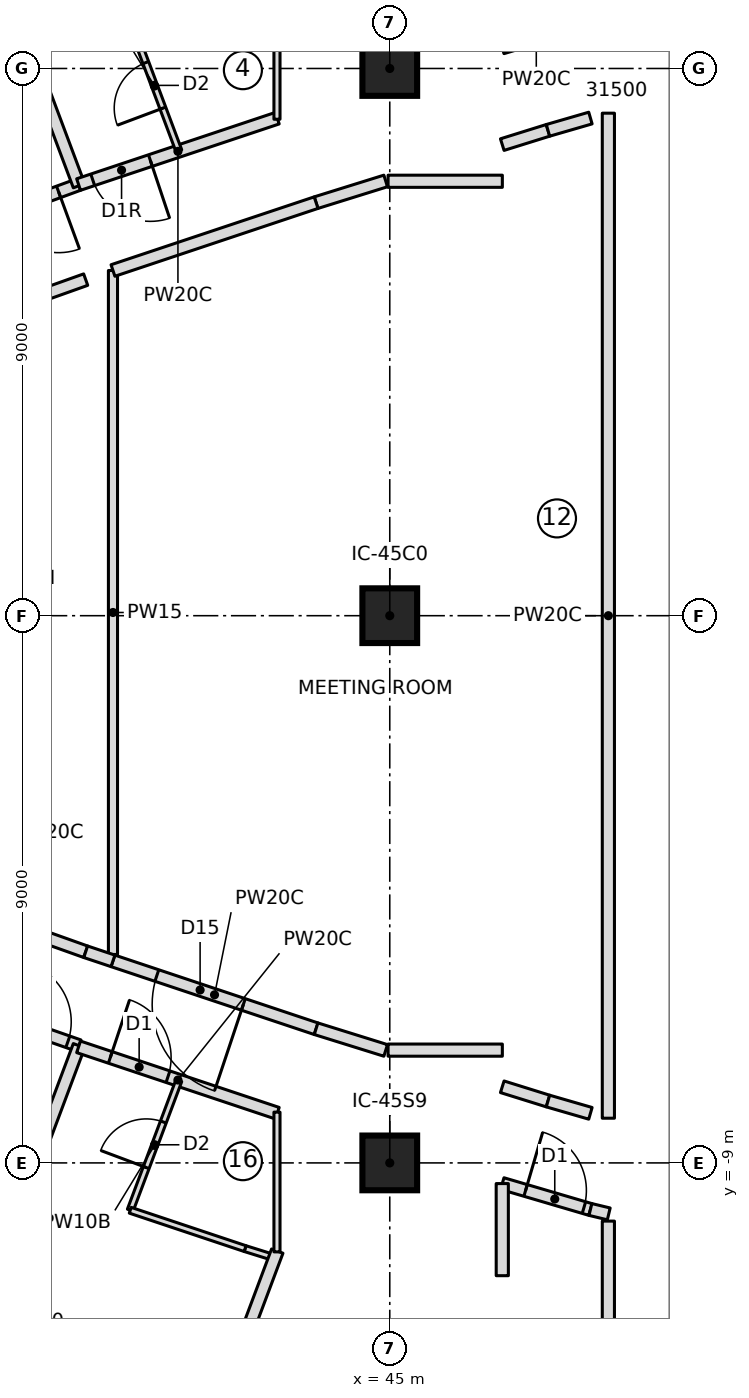
"""IFC4 building model, lengths in metres.
Left out: names, types, materials, properties, quantities, classifications, styles, units other than length and angle.
Written with IfcOpenShell. Run it as: python <this file> out.ifc"""

import sys

from ifc_helpers import new_model, si_unit, direction, frame, frame_2d, origin, origin_2d, place, context, subcontext, project, spatial, rectangle, extrude, element, fill, save


model = new_model("IFC4")
c1 = context("Model", 3, precision=1e-05, world=origin(), true_north=direction((0.0, 1.0)))
c2 = subcontext(c1, "Body", "Model", "MODEL_VIEW")
j1 = project(units=[si_unit("LENGTHUNIT", "METRE"), si_unit("PLANEANGLEUNIT", "RADIAN")], contexts=[c1])
p1 = place(None, origin())
s1 = spatial("IfcSite", under=j1, at=p1, CompositionType="ELEMENT")
p2 = place(p1, origin())
s2 = spatial("IfcBuilding", under=s1, at=p2, CompositionType="ELEMENT")
p3 = place(p2, frame((0.0, 0.0, 224.35)))
s3 = spatial("IfcBuildingStorey", under=s2, at=p3, CompositionType="ELEMENT", Elevation=224.35)
for number, where, z_axis, x_axis in (
    (1, (45.0, -9.0, 0.0), (0.0, 0.0, 1.0), (1.0, 0.0, 0.0)),
    (2, (45.0, 0.0, 0.0), (0.0, 0.0, 1.0), (1.0, 0.0, 0.0)),
    (3, (45.0, 9.0, 0.0), (0.0, 0.0, 1.0), (1.0, 0.0, 0.0)),
):
    element("IfcColumn", number, at=place(p3, frame(where, z_axis=z_axis, x_axis=x_axis)), inside=s3, PredefinedType="COLUMN", context=c2, shape_type="SweptSolid", body=[
        extrude(rectangle(XDim=0.9, YDim=0.9, at=origin_2d()), origin(), (0.0, 0.0, 1.0), 3.55),
    ])
p4 = place(p3, frame((39.882, 7.091, 0.0), z_axis=(0.0, 0.0, 1.0), x_axis=(-0.938916907106, -0.344143925634, 0.0)))
e4 = element("IfcWall", 4, at=p4, inside=s3, PredefinedType="PARTITIONING", context=c2, shape_type="SweptSolid", body=[
    extrude(rectangle(XDim=8.488, YDim=0.2, at=frame_2d((4.244, 0.0))), origin(), (0.0, 0.0, 1.0), 3.25),
])
p5 = place(p4, frame((0.35, 0.0, 0.0)))
e5 = element("IfcOpeningElement", 5, at=p5, cuts=e4, PredefinedType="OPENING", context=c2, shape_type="SweptSolid", body=[
    extrude(rectangle(XDim=1.0, YDim=2.1, at=frame_2d((0.5, 1.05))), frame((0.0, 0.11, 0.0), z_axis=(0.0, -1.0, 0.0), x_axis=(1.0, 0.0, 0.0)), (0.0, 0.0, 1.0), 0.22),
])
p6 = place(p3, frame((39.889, 7.072, 0.0), z_axis=(0.0, 0.0, 1.0), x_axis=(-0.35112895446, 0.936327110224, 0.0)))
e6 = element("IfcWall", 6, at=p6, inside=s3, PredefinedType="PARTITIONING", context=c2, shape_type="SweptSolid", body=[
    extrude(rectangle(XDim=9.706, YDim=0.2, at=frame_2d((4.853, 0.0))), origin(), (0.0, 0.0, 1.0), 3.25),
])
p7 = place(p3, frame((43.15, 8.183, 0.0), z_axis=(0.0, 0.0, 1.0), x_axis=(-0.948477584784, -0.316844238013, 0.0)))
e7 = element("IfcWall", 7, at=p7, inside=s3, PredefinedType="PARTITIONING", context=c2, shape_type="SweptSolid", body=[
    extrude(rectangle(XDim=3.445, YDim=0.2, at=frame_2d((1.723, 0.0))), origin(), (0.0, 0.0, 1.0), 3.25),
])
p8 = place(p7, frame((2.2, 0.0, 0.0)))
e8 = element("IfcOpeningElement", 8, at=p8, cuts=e7, PredefinedType="OPENING", context=c2, shape_type="SweptSolid", body=[
    extrude(rectangle(XDim=1.0, YDim=2.1, at=frame_2d((0.5, 1.05))), frame((0.0, 0.11, 0.0), z_axis=(0.0, -1.0, 0.0), x_axis=(1.0, 0.0, 0.0)), (0.0, 0.0, 1.0), 0.22),
])
p9 = place(p3, frame((41.532, 7.645, 0.0), z_axis=(0.0, 0.0, 1.0), x_axis=(-0.351146927505, 0.936320370014, 0.0)))
e9 = element("IfcWall", 9, at=p9, inside=s3, PredefinedType="PARTITIONING", context=c2, shape_type="SweptSolid", body=[
    extrude(rectangle(XDim=2.278, YDim=0.1, at=frame_2d((1.139, 0.0))), origin(), (0.0, 0.0, 1.0), 3.25),
])
p10 = place(p9, frame((0.75, 0.0, 0.0)))
e10 = element("IfcOpeningElement", 10, at=p10, cuts=e9, PredefinedType="OPENING", context=c2, shape_type="SweptSolid", body=[
    extrude(rectangle(XDim=0.8, YDim=2.1, at=frame_2d((0.4, 1.05))), frame((0.0, 0.06, 0.0), z_axis=(0.0, -1.0, 0.0), x_axis=(1.0, 0.0, 0.0)), (0.0, 0.0, 1.0), 0.12),
])
p11 = place(p3, frame((47.969, 9.671, 0.0), z_axis=(0.0, 0.0, 1.0), x_axis=(-0.958867721668, -0.283853293696, 0.0)))
e11 = element("IfcWall", 11, at=p11, inside=s3, PredefinedType="PARTITIONING", context=c2, shape_type="SweptSolid", body=[
    extrude(rectangle(XDim=1.167, YDim=0.2, at=frame_2d((0.583, 0.0))), origin(), (0.0, 0.0, 1.0), 3.25),
])
p12 = place(p3, frame((35.882, -5.673, 0.0), z_axis=(0.0, 0.0, 1.0), x_axis=(0.944107376821, -0.329638075823, 0.0)))
e12 = element("IfcWall", 12, at=p12, inside=s3, PredefinedType="PARTITIONING", context=c2, shape_type="SweptSolid", body=[
    extrude(rectangle(XDim=4.245, YDim=0.2, at=frame_2d((2.122, 0.0))), origin(), (0.0, 0.0, 1.0), 3.25),
])
p13 = place(p12, frame((3.05, 0.0, 0.0)))
e13 = element("IfcOpeningElement", 13, at=p13, cuts=e12, PredefinedType="OPENING", context=c2, shape_type="SweptSolid", body=[
    extrude(rectangle(XDim=1.0, YDim=2.1, at=frame_2d((0.5, 1.05))), frame((0.0, 0.11, 0.0), z_axis=(0.0, -1.0, 0.0), x_axis=(1.0, 0.0, 0.0)), (0.0, 0.0, 1.0), 0.22),
])
p14 = place(p3, frame((36.481, -16.161, 0.0), z_axis=(0.0, 0.0, 1.0), x_axis=(0.35112895446, 0.936327110224, 0.0)))
e14 = element("IfcWall", 14, at=p14, inside=s3, PredefinedType="PARTITIONING", context=c2, shape_type="SweptSolid", body=[
    extrude(rectangle(XDim=9.706, YDim=0.2, at=frame_2d((4.853, 0.0))), origin(), (0.0, 0.0, 1.0), 3.25),
])
p15 = place(p3, frame((39.882, -7.091, 0.0), z_axis=(0.0, 0.0, 1.0), x_axis=(0.948477584784, -0.316844238013, 0.0)))
e15 = element("IfcWall", 15, at=p15, inside=s3, PredefinedType="PARTITIONING", context=c2, shape_type="SweptSolid", body=[
    extrude(rectangle(XDim=3.445, YDim=0.2, at=frame_2d((1.723, 0.0))), origin(), (0.0, 0.0, 1.0), 3.25),
])
p16 = place(p15, frame((0.55, 0.0, 0.0)))
e16 = element("IfcOpeningElement", 16, at=p16, cuts=e15, PredefinedType="OPENING", context=c2, shape_type="SweptSolid", body=[
    extrude(rectangle(XDim=1.0, YDim=2.1, at=frame_2d((0.5, 1.05))), frame((0.0, 0.11, 0.0), z_axis=(0.0, -1.0, 0.0), x_axis=(1.0, 0.0, 0.0)), (0.0, 0.0, 1.0), 0.22),
])
p17 = place(p3, frame((40.732, -9.779, 0.0), z_axis=(0.0, 0.0, 1.0), x_axis=(0.351146927505, 0.936320370014, 0.0)))
e17 = element("IfcWall", 17, at=p17, inside=s3, PredefinedType="PARTITIONING", context=c2, shape_type="SweptSolid", body=[
    extrude(rectangle(XDim=2.278, YDim=0.1, at=frame_2d((1.139, 0.0))), origin(), (0.0, 0.0, 1.0), 3.25),
])
p18 = place(p17, frame((0.75, 0.0, 0.0)))
e18 = element("IfcOpeningElement", 18, at=p18, cuts=e17, PredefinedType="OPENING", context=c2, shape_type="SweptSolid", body=[
    extrude(rectangle(XDim=0.8, YDim=2.1, at=frame_2d((0.4, 1.05))), frame((0.0, 0.06, 0.0), z_axis=(0.0, -1.0, 0.0), x_axis=(1.0, 0.0, 0.0)), (0.0, 0.0, 1.0), 0.12),
])
p19 = place(p3, frame((43.108, -10.562, 0.0), z_axis=(0.0, 0.0, 1.0), x_axis=(-0.954624465478, 0.297812239356, 0.0)))
e19 = element("IfcWall", 19, at=p19, inside=s3, PredefinedType="PARTITIONING", context=c2, shape_type="SweptSolid", body=[
    extrude(rectangle(XDim=0.511, YDim=0.1, at=frame_2d((0.255, 0.0))), origin(), (0.0, 0.0, 1.0), 3.25),
])
p20 = place(p3, frame((42.621, -10.409, 0.0), z_axis=(0.0, 0.0, 1.0), x_axis=(-0.948499248693, 0.316779379426, 0.0)))
e20 = element("IfcWall", 20, at=p20, inside=s3, PredefinedType="PARTITIONING", context=c2, shape_type="SweptSolid", body=[
    extrude(rectangle(XDim=1.991, YDim=0.1, at=frame_2d((0.996, 0.0))), origin(), (0.0, 0.0, 1.0), 3.25),
])
p21 = place(p3, frame((40.506, -17.501, 0.0), z_axis=(0.0, 0.0, 1.0), x_axis=(0.351119888923, 0.936330509811, 0.0)))
e21 = element("IfcWall", 21, at=p21, inside=s3, PredefinedType="PARTITIONING", context=c2, shape_type="SweptSolid", body=[
    extrude(rectangle(XDim=7.531, YDim=0.2, at=frame_2d((3.766, 0.0))), origin(), (0.0, 0.0, 1.0), 3.25),
])
p22 = place(p3, frame((39.999, -5.527, 0.0), z_axis=(0.0, 0.0, 1.0), x_axis=(-0.941909090846, 0.335867927288, 0.0)))
e22 = element("IfcWall", 22, at=p22, inside=s3, PredefinedType="PARTITIONING", context=c2, shape_type="SweptSolid", body=[
    extrude(rectangle(XDim=3.995, YDim=0.2, at=frame_2d((1.998, 0.0))), origin(), (0.0, 0.0, 1.0), 3.25),
])
p23 = place(p22, frame((1.498, 0.0, 0.0)))
e23 = element("IfcOpeningElement", 23, at=p23, cuts=e22, PredefinedType="OPENING", context=c2, shape_type="SweptSolid", body=[
    extrude(rectangle(XDim=1.0, YDim=2.1, at=frame_2d((0.5, 1.05))), frame((0.0, 0.11, 0.0), z_axis=(0.0, -1.0, 0.0), x_axis=(1.0, 0.0, 0.0)), (0.0, 0.0, 1.0), 0.22),
])
p24 = place(p3, frame((36.236, 4.186, 0.0), z_axis=(0.0, 0.0, 1.0), x_axis=(0.941909090846, 0.335867927288, 0.0)))
e24 = element("IfcWall", 24, at=p24, inside=s3, PredefinedType="PARTITIONING", context=c2, shape_type="SweptSolid", body=[
    extrude(rectangle(XDim=3.995, YDim=0.2, at=frame_2d((1.998, 0.0))), origin(), (0.0, 0.0, 1.0), 3.25),
])
p25 = place(p3, frame((40.448, -5.572, 0.0), z_axis=(0.0, 0.0, 1.0), x_axis=(0.0, 1.0, 0.0)))
e25 = element("IfcWall", 25, at=p25, inside=s3, PredefinedType="PARTITIONING", context=c2, shape_type="SweptSolid", body=[
    extrude(rectangle(XDim=11.249, YDim=0.15, at=frame_2d((5.625, 0.0))), origin(), (0.0, 0.0, 1.0), 3.25),
])
p26 = place(p3, frame((43.788, -6.793, 0.0), z_axis=(0.0, 0.0, 1.0), x_axis=(-0.948475139593, 0.316851557632, 0.0)))
e26 = element("IfcWall", 26, at=p26, inside=s3, PredefinedType="PARTITIONING", context=c2, shape_type="SweptSolid", body=[
    extrude(rectangle(XDim=3.522, YDim=0.2, at=frame_2d((1.761, 0.0))), origin(), (0.0, 0.0, 1.0), 3.25),
])
p27 = place(p26, frame((1.261, 0.0, 0.0)))
e27 = element("IfcOpeningElement", 27, at=p27, cuts=e26, PredefinedType="OPENING", context=c2, shape_type="SweptSolid", body=[
    extrude(rectangle(XDim=1.5, YDim=2.1, at=frame_2d((0.75, 1.05))), frame((0.0, 0.11, 0.0), z_axis=(0.0, -1.0, 0.0), x_axis=(1.0, 0.0, 0.0)), (0.0, 0.0, 1.0), 0.22),
])
p28 = place(p3, frame((43.788, 6.793, 0.0), z_axis=(0.0, 0.0, 1.0), x_axis=(0.954693570678, 0.29759063511, 0.0)))
e28 = element("IfcWall", 28, at=p28, inside=s3, PredefinedType="PARTITIONING", context=c2, shape_type="SweptSolid", body=[
    extrude(rectangle(XDim=1.198, YDim=0.2, at=frame_2d((0.599, 0.0))), origin(), (0.0, 0.0, 1.0), 3.25),
])
for number, where, z_axis, x_axis in (
    (29, (46.85, 7.748, 0.0), (0.0, 0.0, 1.0), (0.955, 0.298, 0.0)),
    (30, (47.602, -7.982, 0.0), (0.0, 0.0, 1.0), (-0.955, 0.298, 0.0)),
):
    element("IfcWall", number, at=place(p3, frame(where, z_axis=z_axis, x_axis=x_axis)), inside=s3, PredefinedType="PARTITIONING", context=c2, shape_type="SweptSolid", body=[
        extrude(rectangle(XDim=0.788, YDim=0.2, at=frame_2d((0.394, 0.0))), origin(), (0.0, 0.0, 1.0), 3.25),
    ])
p29 = place(p3, frame((44.933, -7.15, 0.0), z_axis=(0.0, 0.0, 1.0), x_axis=(-0.954693570678, 0.29759063511, 0.0)))
e31 = element("IfcWall", 31, at=p29, inside=s3, PredefinedType="PARTITIONING", context=c2, shape_type="SweptSolid", body=[
    extrude(rectangle(XDim=1.198, YDim=0.2, at=frame_2d((0.599, 0.0))), origin(), (0.0, 0.0, 1.0), 3.25),
])
p30 = place(p3, frame((40.448, 5.677, 0.0), z_axis=(0.0, 0.0, 1.0), x_axis=(0.948475139593, 0.316851557632, 0.0)))
e32 = element("IfcWall", 32, at=p30, inside=s3, PredefinedType="PARTITIONING", context=c2, shape_type="SweptSolid", body=[
    extrude(rectangle(XDim=3.522, YDim=0.2, at=frame_2d((1.761, 0.0))), origin(), (0.0, 0.0, 1.0), 3.25),
])
for number, where, z_axis, x_axis in (
    (33, (43.145, 10.463, 0.0), (0.0, 0.0, 1.0), (0.0, -1.0, 0.0)),
    (34, (43.145, -8.165, 0.0), (0.0, 0.0, 1.0), (0.0, -1.0, 0.0)),
):
    element("IfcWall", number, at=place(p3, frame(where, z_axis=z_axis, x_axis=x_axis)), inside=s3, PredefinedType="PARTITIONING", context=c2, shape_type="SweptSolid", body=[
        extrude(rectangle(XDim=2.298, YDim=0.1, at=frame_2d((1.149, 0.0))), origin(), (0.0, 0.0, 1.0), 3.25),
    ])
p31 = place(p3, frame((46.85, -9.34, 0.0), z_axis=(0.0, 0.0, 1.0), x_axis=(0.95944263903, -0.281903924079, 0.0)))
e35 = element("IfcWall", 35, at=p31, inside=s3, PredefinedType="PARTITIONING", context=c2, shape_type="SweptSolid", body=[
    extrude(rectangle(XDim=1.511, YDim=0.2, at=frame_2d((0.756, 0.0))), origin(), (0.0, 0.0, 1.0), 3.25),
])
p32 = place(p31, frame((0.4, 0.0, 0.0)))
e36 = element("IfcOpeningElement", 36, at=p32, cuts=e35, PredefinedType="OPENING", context=c2, shape_type="SweptSolid", body=[
    extrude(rectangle(XDim=1.0, YDim=2.1, at=frame_2d((0.5, 1.05))), frame((0.0, 0.11, 0.0), z_axis=(0.0, -1.0, 0.0), x_axis=(1.0, 0.0, 0.0)), (0.0, 0.0, 1.0), 0.22),
])
for number, where, z_axis, x_axis in (
    (37, (47.602, 7.982, 0.0), (0.0, 0.0, 1.0), (0.96, 0.278, 0.0)),
    (38, (48.3, -8.185, 0.0), (0.0, 0.0, 1.0), (-0.96, 0.278, 0.0)),
):
    element("IfcWall", number, at=place(p3, frame(where, z_axis=z_axis, x_axis=x_axis)), inside=s3, PredefinedType="PARTITIONING", context=c2, shape_type="SweptSolid", body=[
        extrude(rectangle(XDim=0.727, YDim=0.2, at=frame_2d((0.363, 0.0))), origin(), (0.0, 0.0, 1.0), 3.25),
    ])
p33 = place(p3, frame((44.972, 7.145, 0.0), z_axis=(0.0, 0.0, 1.0), x_axis=(0.99999999156, 0.000129920747, 0.0)))
e39 = element("IfcWall", 39, at=p33, inside=s3, PredefinedType="PARTITIONING", context=c2, shape_type="SweptSolid", body=[
    extrude(rectangle(XDim=1.879, YDim=0.2, at=frame_2d((0.939, 0.0))), origin(), (0.0, 0.0, 1.0), 3.25),
])
p34 = place(p3, frame((48.595, 8.265, 0.0), z_axis=(0.0, 0.0, 1.0), x_axis=(0.0, -1.0, 0.0)))
e40 = element("IfcWall", 40, at=p34, inside=s3, PredefinedType="PARTITIONING", context=c2, shape_type="SweptSolid", body=[
    extrude(rectangle(XDim=16.53, YDim=0.2, at=frame_2d((8.265, 0.0))), origin(), (0.0, 0.0, 1.0), 3.25),
])
p35 = place(p3, frame((46.852, -7.145, 0.0), z_axis=(0.0, 0.0, 1.0), x_axis=(-0.99999999156, 0.000129920747, 0.0)))
e41 = element("IfcWall", 41, at=p35, inside=s3, PredefinedType="PARTITIONING", context=c2, shape_type="SweptSolid", body=[
    extrude(rectangle(XDim=1.879, YDim=0.2, at=frame_2d((0.939, 0.0))), origin(), (0.0, 0.0, 1.0), 3.25),
])
p36 = place(p3, frame((46.851, -10.855, 0.0), z_axis=(0.0, 0.0, 1.0), x_axis=(-0.000322320692, 0.999999948055, 0.0)))
e42 = element("IfcWall", 42, at=p36, inside=s3, PredefinedType="PARTITIONING", context=c2, shape_type="SweptSolid", body=[
    extrude(rectangle(XDim=1.515, YDim=0.2, at=frame_2d((0.757, 0.0))), origin(), (0.0, 0.0, 1.0), 3.25),
])
p37 = place(p3, frame((48.3, -9.766, 0.0), z_axis=(0.0, 0.0, 1.0), x_axis=(0.972415906571, -0.233253734477, 0.0)))
e43 = element("IfcWall", 43, at=p37, inside=s3, PredefinedType="PARTITIONING", context=c2, shape_type="SweptSolid", body=[
    extrude(rectangle(XDim=0.31, YDim=0.2, at=frame_2d((0.155, 0.0))), origin(), (0.0, 0.0, 1.0), 3.25),
])
p38 = place(p3, frame((48.595, -9.957, 0.0), z_axis=(0.0, 0.0, 1.0), x_axis=(0.0, -1.0, 0.0)))
e44 = element("IfcWall", 44, at=p38, inside=s3, PredefinedType="PARTITIONING", context=c2, shape_type="SweptSolid", body=[
    extrude(rectangle(XDim=9.972, YDim=0.2, at=frame_2d((4.986, 0.0))), origin(), (0.0, 0.0, 1.0), 3.25),
])
p39 = place(p3, frame((40.448, -5.677, 0.0), z_axis=(0.0, 0.0, 1.0), x_axis=(-0.948424836926, 0.317002095739, 0.0)))
e45 = element("IfcWall", 45, at=p39, inside=s3, PredefinedType="PARTITIONING", context=c2, shape_type="SweptSolid", body=[
    extrude(rectangle(XDim=0.473, YDim=0.2, at=frame_2d((0.236, 0.0))), origin(), (0.0, 0.0, 1.0), 3.25),
])
p40 = place(p5, origin())
e46 = element("IfcDoor", 46, at=p40, inside=s3, OperationType="SINGLE_SWING_RIGHT", PredefinedType="DOOR", context=c2, shape_type="SweptSolid", body=[
    extrude(rectangle(XDim=1.0, YDim=2.1, at=frame_2d((0.5, 1.05))), frame((0.0, 0.025, 0.0), z_axis=(0.0, -1.0, 0.0), x_axis=(1.0, 0.0, 0.0)), (0.0, 0.0, 1.0), 0.05),
])
fill(e5, e46)
p41 = place(p10, origin())
e47 = element("IfcDoor", 47, at=p41, inside=s3, OperationType="SINGLE_SWING_LEFT", PredefinedType="DOOR", context=c2, shape_type="SweptSolid", body=[
    extrude(rectangle(XDim=0.8, YDim=2.1, at=frame_2d((0.4, 1.05))), frame((0.0, 0.025, 0.0), z_axis=(0.0, -1.0, 0.0), x_axis=(1.0, 0.0, 0.0)), (0.0, 0.0, 1.0), 0.05),
])
fill(e10, e47)
p42 = place(p8, origin())
e48 = element("IfcDoor", 48, at=p42, inside=s3, OperationType="SINGLE_SWING_RIGHT", PredefinedType="DOOR", context=c2, shape_type="SweptSolid", body=[
    extrude(rectangle(XDim=1.0, YDim=2.1, at=frame_2d((0.5, 1.05))), frame((0.0, 0.025, 0.0), z_axis=(0.0, -1.0, 0.0), x_axis=(1.0, 0.0, 0.0)), (0.0, 0.0, 1.0), 0.05),
])
fill(e8, e48)
p43 = place(p13, origin())
e49 = element("IfcDoor", 49, at=p43, inside=s3, OperationType="SINGLE_SWING_LEFT", PredefinedType="DOOR", context=c2, shape_type="SweptSolid", body=[
    extrude(rectangle(XDim=1.0, YDim=2.1, at=frame_2d((0.5, 1.05))), frame((0.0, 0.025, 0.0), z_axis=(0.0, -1.0, 0.0), x_axis=(1.0, 0.0, 0.0)), (0.0, 0.0, 1.0), 0.05),
])
fill(e13, e49)
p44 = place(p18, origin())
e50 = element("IfcDoor", 50, at=p44, inside=s3, OperationType="SINGLE_SWING_LEFT", PredefinedType="DOOR", context=c2, shape_type="SweptSolid", body=[
    extrude(rectangle(XDim=0.8, YDim=2.1, at=frame_2d((0.4, 1.05))), frame((0.0, 0.025, 0.0), z_axis=(0.0, -1.0, 0.0), x_axis=(1.0, 0.0, 0.0)), (0.0, 0.0, 1.0), 0.05),
])
fill(e18, e50)
p45 = place(p16, origin())
e51 = element("IfcDoor", 51, at=p45, inside=s3, OperationType="SINGLE_SWING_LEFT", PredefinedType="DOOR", context=c2, shape_type="SweptSolid", body=[
    extrude(rectangle(XDim=1.0, YDim=2.1, at=frame_2d((0.5, 1.05))), frame((0.0, 0.025, 0.0), z_axis=(0.0, -1.0, 0.0), x_axis=(1.0, 0.0, 0.0)), (0.0, 0.0, 1.0), 0.05),
])
fill(e16, e51)
p46 = place(p32, origin())
e52 = element("IfcDoor", 52, at=p46, inside=s3, OperationType="SINGLE_SWING_LEFT", PredefinedType="DOOR", context=c2, shape_type="SweptSolid", body=[
    extrude(rectangle(XDim=1.0, YDim=2.1, at=frame_2d((0.5, 1.05))), frame((0.0, 0.025, 0.0), z_axis=(0.0, -1.0, 0.0), x_axis=(1.0, 0.0, 0.0)), (0.0, 0.0, 1.0), 0.05),
])
fill(e36, e52)
p47 = place(p27, origin())
e53 = element("IfcDoor", 53, at=p47, inside=s3, OperationType="DOUBLE_DOOR_SINGLE_SWING", PredefinedType="DOOR", context=c2, shape_type="SweptSolid", body=[
    extrude(rectangle(XDim=1.5, YDim=2.1, at=frame_2d((0.75, 1.05))), frame((0.0, 0.025, 0.0), z_axis=(0.0, -1.0, 0.0), x_axis=(1.0, 0.0, 0.0)), (0.0, 0.0, 1.0), 0.05),
])
fill(e27, e53)
save(model, sys.argv[1])
